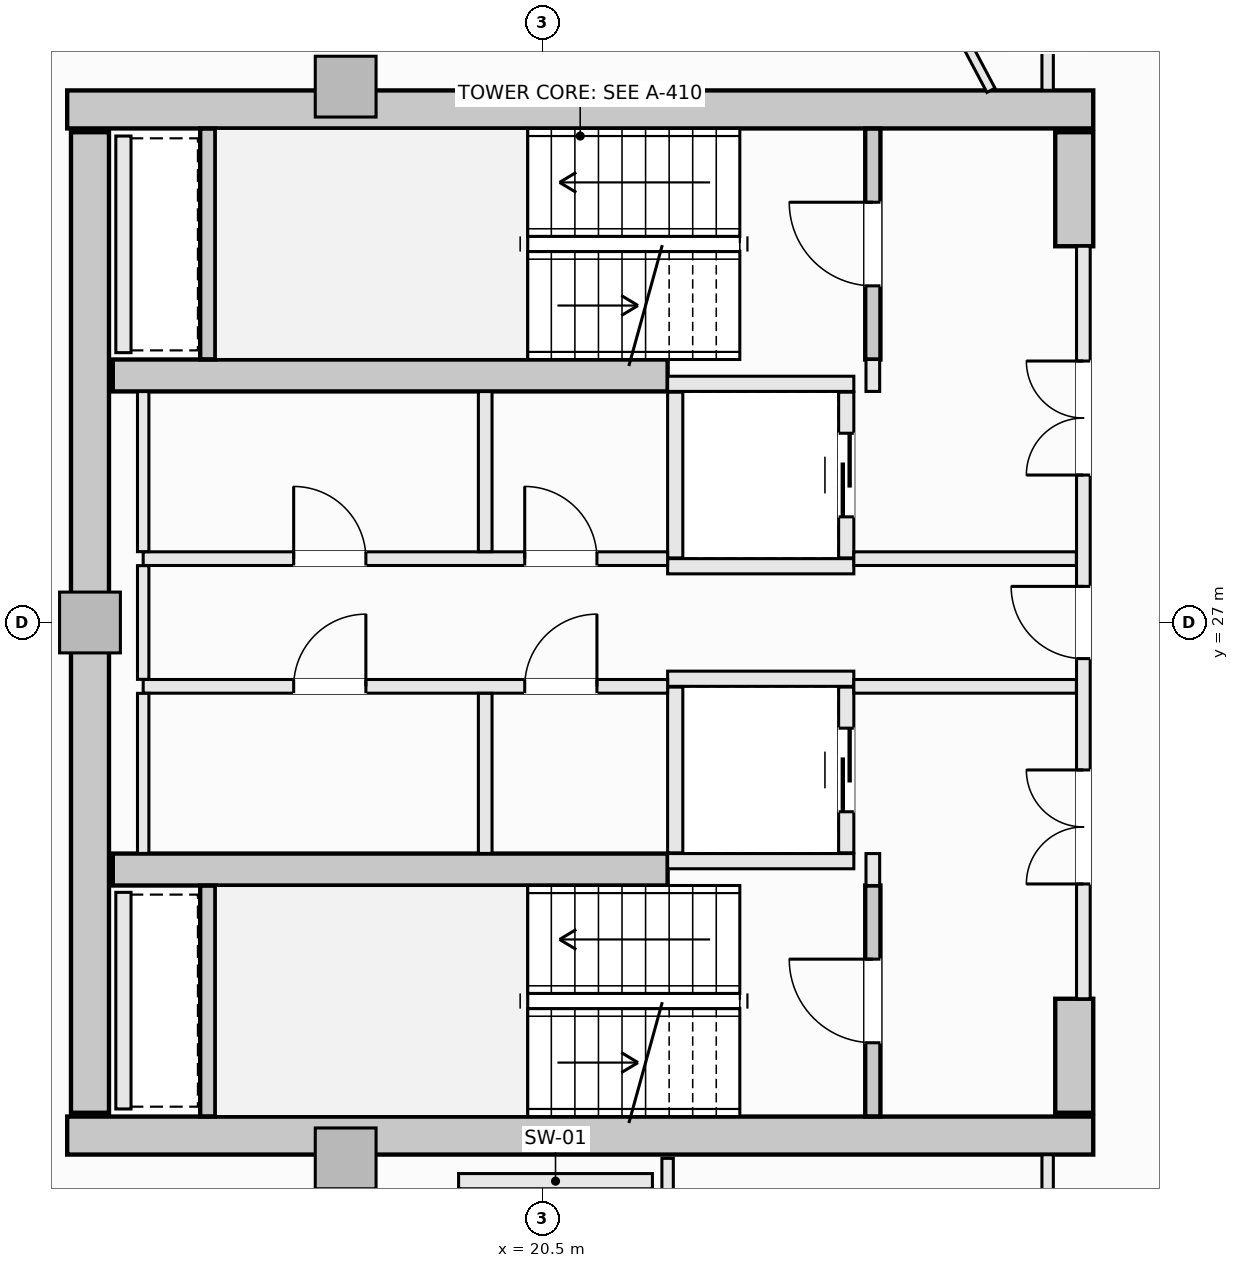
"""IFC4 building model, lengths in metres.
Left out: names, types, materials, properties, quantities, classifications, styles, units other than length and angle.
Written with IfcOpenShell. Run it as: python <this file> out.ifc"""

import sys

from ifc_helpers import new_model, si_unit, direction, frame, frame_2d, origin, origin_2d, place, context, subcontext, project, spatial, rectangle, extrude, element, fill, save


model = new_model("IFC4")
c1 = context("Model", 3, precision=1e-05, world=origin(), true_north=direction((0.0, 1.0)))
c2 = subcontext(c1, "Body", "Model", "MODEL_VIEW")
j1 = project(units=[si_unit("LENGTHUNIT", "METRE"), si_unit("PLANEANGLEUNIT", "RADIAN")], contexts=[c1])
p1 = place(None, origin())
s1 = spatial("IfcSite", under=j1, at=p1, CompositionType="ELEMENT")
p2 = place(p1, origin())
s2 = spatial("IfcBuilding", under=s1, at=p2, CompositionType="ELEMENT")
p3 = place(p2, frame((0.0, 0.0, 212.9)))
s3 = spatial("IfcBuildingStorey", under=s2, at=p3, CompositionType="ELEMENT", Elevation=212.9)
for number, where, z_axis, x_axis in (
    (1, (14.25, 33.75, -0.27), (0.0, 0.0, 1.0), (1.0, 0.0, 0.0)),
    (2, (14.25, 20.25, -0.27), (0.0, 0.0, 1.0), (1.0, 0.0, 0.0)),
):
    element("IfcWall", number, at=place(p3, frame(where, z_axis=z_axis, x_axis=x_axis)), inside=s3, PredefinedType="SHEAR", context=c2, shape_type="SweptSolid", body=[
        extrude(rectangle(XDim=13.5, YDim=0.5, at=frame_2d((6.75, 0.0))), origin(), (0.0, 0.0, 1.0), 3.3),
    ])
p4 = place(p3, frame((14.55, 20.55, -0.27), z_axis=(0.0, 0.0, 1.0), x_axis=(0.0, 1.0, 0.0)))
e3 = element("IfcWall", 3, at=p4, inside=s3, PredefinedType="SHEAR", context=c2, shape_type="SweptSolid", body=[
    extrude(rectangle(XDim=12.9, YDim=0.5, at=frame_2d((6.45, 0.0))), origin(), (0.0, 0.0, 1.0), 3.3),
])
for number, where, z_axis, x_axis in (
    (4, (27.5, 31.95, -0.27), (0.0, 0.0, 1.0), (0.0, 1.0, 0.0)),
    (5, (27.5, 20.55, -0.27), (0.0, 0.0, 1.0), (0.0, 1.0, 0.0)),
):
    element("IfcWall", number, at=place(p3, frame(where, z_axis=z_axis, x_axis=x_axis)), inside=s3, PredefinedType="SHEAR", context=c2, shape_type="SweptSolid", body=[
        extrude(rectangle(XDim=1.5, YDim=0.5, at=frame_2d((0.75, 0.0))), origin(), (0.0, 0.0, 1.0), 3.3),
    ])
for number, where, z_axis, x_axis in (
    (6, (14.85, 30.25, -0.27), (0.0, 0.0, 1.0), (1.0, 0.0, 0.0)),
    (7, (14.85, 23.75, -0.27), (0.0, 0.0, 1.0), (1.0, 0.0, 0.0)),
):
    element("IfcWall", number, at=place(p3, frame(where, z_axis=z_axis, x_axis=x_axis)), inside=s3, PredefinedType="SHEAR", context=c2, shape_type="SweptSolid", body=[
        extrude(rectangle(XDim=7.3, YDim=0.42, at=frame_2d((3.65, 0.0))), origin(), (0.0, 0.0, 1.0), 3.3),
    ])
for number, where, z_axis, x_axis in (
    (8, (17.914, 34.05, -0.27), (0.0, 0.0, 1.0), (1.0, 0.0, 0.0)),
    (9, (14.55, 27.0, -0.27), (0.0, 0.0, 1.0), (1.0, 0.0, 0.0)),
    (10, (17.914, 19.95, -0.27), (0.0, 0.0, 1.0), (1.0, 0.0, 0.0)),
):
    element("IfcColumn", number, at=place(p3, frame(where, z_axis=z_axis, x_axis=x_axis)), inside=s3, PredefinedType="PILASTER", context=c2, shape_type="SweptSolid", body=[
        extrude(rectangle(XDim=0.8, YDim=0.8, at=origin_2d()), origin(), (0.0, 0.0, 1.0), 3.3),
    ])
p5 = place(p3, frame((24.85, 30.46, -0.27), z_axis=(0.0, 0.0, 1.0), x_axis=(0.0, 1.0, 0.0)))
e11 = element("IfcWall", 11, at=p5, inside=s3, PredefinedType="SHEAR", context=c2, shape_type="SweptSolid", body=[
    extrude(rectangle(XDim=3.038, YDim=0.2, at=frame_2d((1.519, 0.0))), origin(), (0.0, 0.0, 1.0), 3.3),
])
p6 = place(p5, frame((0.969, 0.0, 0.27)))
e12 = element("IfcOpeningElement", 12, at=p6, cuts=e11, PredefinedType="OPENING", context=c2, shape_type="SweptSolid", body=[
    extrude(rectangle(XDim=1.1, YDim=2.15, at=frame_2d((0.55, 1.075))), frame((0.0, 0.11, 0.0), z_axis=(0.0, -1.0, 0.0), x_axis=(1.0, 0.0, 0.0)), (0.0, 0.0, 1.0), 0.22),
])
p7 = place(p3, frame((16.1, 30.462, -0.27), z_axis=(0.0, 0.0, 1.0), x_axis=(0.0, 1.0, 0.0)))
e13 = element("IfcWall", 13, at=p7, inside=s3, PredefinedType="SHEAR", context=c2, shape_type="SweptSolid", body=[
    extrude(rectangle(XDim=3.036, YDim=0.2, at=frame_2d((1.518, 0.0))), origin(), (0.0, 0.0, 1.0), 3.3),
])
p8 = place(p3, frame((24.85, 20.502, -0.27), z_axis=(0.0, 0.0, 1.0), x_axis=(0.0, 1.0, 0.0)))
e14 = element("IfcWall", 14, at=p8, inside=s3, PredefinedType="SHEAR", context=c2, shape_type="SweptSolid", body=[
    extrude(rectangle(XDim=3.038, YDim=0.2, at=frame_2d((1.519, 0.0))), origin(), (0.0, 0.0, 1.0), 3.3),
])
p9 = place(p8, frame((0.969, 0.0, 0.27)))
e15 = element("IfcOpeningElement", 15, at=p9, cuts=e14, PredefinedType="OPENING", context=c2, shape_type="SweptSolid", body=[
    extrude(rectangle(XDim=1.1, YDim=2.15, at=frame_2d((0.55, 1.075))), frame((0.0, 0.11, 0.0), z_axis=(0.0, -1.0, 0.0), x_axis=(1.0, 0.0, 0.0)), (0.0, 0.0, 1.0), 0.22),
])
p10 = place(p3, frame((16.1, 20.502, -0.27), z_axis=(0.0, 0.0, 1.0), x_axis=(0.0, 1.0, 0.0)))
e16 = element("IfcWall", 16, at=p10, inside=s3, PredefinedType="SHEAR", context=c2, shape_type="SweptSolid", body=[
    extrude(rectangle(XDim=3.036, YDim=0.2, at=frame_2d((1.518, 0.0))), origin(), (0.0, 0.0, 1.0), 3.3),
])
for number, where, z_axis, x_axis in (
    (17, (22.15, 30.14, 0.0), (0.0, 0.0, 1.0), (1.0, 0.0, 0.0)),
    (18, (22.15, 27.74, 0.0), (0.0, 0.0, 1.0), (1.0, 0.0, 0.0)),
):
    element("IfcWall", number, at=place(p3, frame(where, z_axis=z_axis, x_axis=x_axis)), inside=s3, PredefinedType="SOLIDWALL", context=c2, shape_type="SweptSolid", body=[
        extrude(rectangle(XDim=2.45, YDim=0.2, at=frame_2d((1.225, 0.0))), origin(), (0.0, 0.0, 1.0), 3.03),
    ])
p11 = place(p3, frame((22.25, 27.85, 0.0), z_axis=(0.0, 0.0, 1.0), x_axis=(0.0, 1.0, 0.0)))
e19 = element("IfcWall", 19, at=p11, inside=s3, PredefinedType="SOLIDWALL", context=c2, shape_type="SweptSolid", body=[
    extrude(rectangle(XDim=2.18, YDim=0.2, at=frame_2d((1.09, 0.0))), origin(), (0.0, 0.0, 1.0), 3.03),
])
p12 = place(p3, frame((24.5, 27.85, 0.0), z_axis=(0.0, 0.0, 1.0), x_axis=(0.0, 1.0, 0.0)))
e20 = element("IfcWall", 20, at=p12, inside=s3, PredefinedType="SOLIDWALL", context=c2, shape_type="SweptSolid", body=[
    extrude(rectangle(XDim=2.18, YDim=0.2, at=frame_2d((1.09, 0.0))), origin(), (0.0, 0.0, 1.0), 3.03),
])
p13 = place(p12, frame((0.54, 0.0, 0.0)))
e21 = element("IfcOpeningElement", 21, at=p13, cuts=e20, PredefinedType="OPENING", context=c2, shape_type="SweptSolid", body=[
    extrude(rectangle(XDim=1.1, YDim=2.2, at=frame_2d((0.55, 1.1))), frame((0.0, 0.11, 0.0), z_axis=(0.0, -1.0, 0.0), x_axis=(1.0, 0.0, 0.0)), (0.0, 0.0, 1.0), 0.22),
])
for number, where, z_axis, x_axis in (
    (22, (22.15, 26.26, 0.0), (0.0, 0.0, 1.0), (1.0, 0.0, 0.0)),
    (23, (22.15, 23.86, 0.0), (0.0, 0.0, 1.0), (1.0, 0.0, 0.0)),
):
    element("IfcWall", number, at=place(p3, frame(where, z_axis=z_axis, x_axis=x_axis)), inside=s3, PredefinedType="SOLIDWALL", context=c2, shape_type="SweptSolid", body=[
        extrude(rectangle(XDim=2.45, YDim=0.2, at=frame_2d((1.225, 0.0))), origin(), (0.0, 0.0, 1.0), 3.03),
    ])
p14 = place(p3, frame((22.25, 23.97, 0.0), z_axis=(0.0, 0.0, 1.0), x_axis=(0.0, 1.0, 0.0)))
e24 = element("IfcWall", 24, at=p14, inside=s3, PredefinedType="SOLIDWALL", context=c2, shape_type="SweptSolid", body=[
    extrude(rectangle(XDim=2.18, YDim=0.2, at=frame_2d((1.09, 0.0))), origin(), (0.0, 0.0, 1.0), 3.03),
])
p15 = place(p3, frame((24.5, 23.97, 0.0), z_axis=(0.0, 0.0, 1.0), x_axis=(0.0, 1.0, 0.0)))
e25 = element("IfcWall", 25, at=p15, inside=s3, PredefinedType="SOLIDWALL", context=c2, shape_type="SweptSolid", body=[
    extrude(rectangle(XDim=2.18, YDim=0.2, at=frame_2d((1.09, 0.0))), origin(), (0.0, 0.0, 1.0), 3.03),
])
p16 = place(p15, frame((0.54, 0.0, 0.0)))
e26 = element("IfcOpeningElement", 26, at=p16, cuts=e25, PredefinedType="OPENING", context=c2, shape_type="SweptSolid", body=[
    extrude(rectangle(XDim=1.1, YDim=2.2, at=frame_2d((0.55, 1.1))), frame((0.0, 0.11, 0.0), z_axis=(0.0, -1.0, 0.0), x_axis=(1.0, 0.0, 0.0)), (0.0, 0.0, 1.0), 0.22),
])
p17 = place(p3, frame((19.4, 19.65, 0.0), z_axis=(0.0, 0.0, 1.0), x_axis=(1.0, 0.0, 0.0)))
e27 = element("IfcWall", 27, at=p17, inside=s3, PredefinedType="SOLIDWALL", context=c2, shape_type="SweptSolid", body=[
    extrude(rectangle(XDim=2.55, YDim=0.2, at=frame_2d((1.275, 0.0))), origin(), (0.0, 0.0, 1.0), 3.03),
])
for number, where, z_axis, x_axis in (
    (28, (14.99, 30.55, 0.0), (0.0, 0.0, 1.0), (0.0, 1.0, 0.0)),
    (29, (14.99, 20.6, 0.0), (0.0, 0.0, 1.0), (0.0, 1.0, 0.0)),
):
    element("IfcWall", number, at=place(p3, frame(where, z_axis=z_axis, x_axis=x_axis)), inside=s3, PredefinedType="SOLIDWALL", context=c2, shape_type="SweptSolid", body=[
        extrude(rectangle(XDim=2.85, YDim=0.2, at=frame_2d((1.425, 0.0))), origin(), (0.0, 0.0, 1.0), 3.03),
    ])
for number, where, z_axis, x_axis in (
    (30, (24.85, 23.54, 0.0), (0.0, 0.0, 1.0), (0.0, 1.0, 0.0)),
    (31, (24.85, 30.04, 0.0), (0.0, 0.0, 1.0), (0.0, 1.0, 0.0)),
):
    element("IfcWall", number, at=place(p3, frame(where, z_axis=z_axis, x_axis=x_axis)), inside=s3, PredefinedType="SOLIDWALL", context=c2, shape_type="SweptSolid", body=[
        extrude(rectangle(XDim=0.42, YDim=0.18, at=frame_2d((0.21, 0.0))), origin(), (0.0, 0.0, 1.0), 3.03),
    ])
p18 = place(p3, frame((27.62, 22.05, 0.0), z_axis=(0.0, 0.0, 1.0), x_axis=(0.0, 1.0, 0.0)))
e32 = element("IfcWall", 32, at=p18, inside=s3, PredefinedType="SOLIDWALL", context=c2, shape_type="SweptSolid", body=[
    extrude(rectangle(XDim=9.9, YDim=0.18, at=frame_2d((4.95, 0.0))), origin(), (0.0, 0.0, 1.0), 3.03),
])
p19 = place(p18, frame((4.475, 0.0, 0.0)))
e33 = element("IfcOpeningElement", 33, at=p19, cuts=e32, PredefinedType="OPENING", context=c2, shape_type="SweptSolid", body=[
    extrude(rectangle(XDim=0.95, YDim=2.1, at=frame_2d((0.475, 1.05))), frame((0.0, 0.1, 0.0), z_axis=(0.0, -1.0, 0.0), x_axis=(1.0, 0.0, 0.0)), (0.0, 0.0, 1.0), 0.2),
])
p20 = place(p18, frame((6.89, 0.0, 0.0)))
e34 = element("IfcOpeningElement", 34, at=p20, cuts=e32, PredefinedType="OPENING", context=c2, shape_type="SweptSolid", body=[
    extrude(rectangle(XDim=1.5, YDim=2.2, at=frame_2d((0.75, 1.1))), frame((0.0, 0.1, 0.0), z_axis=(0.0, -1.0, 0.0), x_axis=(1.0, 0.0, 0.0)), (0.0, 0.0, 1.0), 0.2),
])
p21 = place(p18, frame((1.51, 0.0, 0.0)))
e35 = element("IfcOpeningElement", 35, at=p21, cuts=e32, PredefinedType="OPENING", context=c2, shape_type="SweptSolid", body=[
    extrude(rectangle(XDim=1.5, YDim=2.2, at=frame_2d((0.75, 1.1))), frame((0.0, 0.1, 0.0), z_axis=(0.0, -1.0, 0.0), x_axis=(1.0, 0.0, 0.0)), (0.0, 0.0, 1.0), 0.2),
])
p22 = place(p3, frame((15.25, 27.84, 0.0), z_axis=(0.0, 0.0, 1.0), x_axis=(1.0, 0.0, 0.0)))
e36 = element("IfcWall", 36, at=p22, inside=s3, PredefinedType="SOLIDWALL", context=c2, shape_type="SweptSolid", body=[
    extrude(rectangle(XDim=6.9, YDim=0.18, at=frame_2d((3.45, 0.0))), origin(), (0.0, 0.0, 1.0), 3.03),
])
p23 = place(p22, frame((5.02, 0.0, 0.0)))
e37 = element("IfcOpeningElement", 37, at=p23, cuts=e36, PredefinedType="OPENING", context=c2, shape_type="SweptSolid", body=[
    extrude(rectangle(XDim=0.95, YDim=2.1, at=frame_2d((0.475, 1.05))), frame((0.0, 0.1, 0.0), z_axis=(0.0, -1.0, 0.0), x_axis=(1.0, 0.0, 0.0)), (0.0, 0.0, 1.0), 0.2),
])
p24 = place(p22, frame((1.98, 0.0, 0.0)))
e38 = element("IfcOpeningElement", 38, at=p24, cuts=e36, PredefinedType="OPENING", context=c2, shape_type="SweptSolid", body=[
    extrude(rectangle(XDim=0.95, YDim=2.1, at=frame_2d((0.475, 1.05))), frame((0.0, 0.1, 0.0), z_axis=(0.0, -1.0, 0.0), x_axis=(1.0, 0.0, 0.0)), (0.0, 0.0, 1.0), 0.2),
])
p25 = place(p3, frame((24.6, 27.84, 0.0), z_axis=(0.0, 0.0, 1.0), x_axis=(1.0, 0.0, 0.0)))
e39 = element("IfcWall", 39, at=p25, inside=s3, PredefinedType="SOLIDWALL", context=c2, shape_type="SweptSolid", body=[
    extrude(rectangle(XDim=2.928, YDim=0.18, at=frame_2d((1.464, 0.0))), origin(), (0.0, 0.0, 1.0), 3.03),
])
p26 = place(p3, frame((15.25, 26.16, 0.0), z_axis=(0.0, 0.0, 1.0), x_axis=(1.0, 0.0, 0.0)))
e40 = element("IfcWall", 40, at=p26, inside=s3, PredefinedType="SOLIDWALL", context=c2, shape_type="SweptSolid", body=[
    extrude(rectangle(XDim=6.9, YDim=0.18, at=frame_2d((3.45, 0.0))), origin(), (0.0, 0.0, 1.0), 3.03),
])
p27 = place(p26, frame((5.02, 0.0, 0.0)))
e41 = element("IfcOpeningElement", 41, at=p27, cuts=e40, PredefinedType="OPENING", context=c2, shape_type="SweptSolid", body=[
    extrude(rectangle(XDim=0.95, YDim=2.1, at=frame_2d((0.475, 1.05))), frame((0.0, 0.1, 0.0), z_axis=(0.0, -1.0, 0.0), x_axis=(1.0, 0.0, 0.0)), (0.0, 0.0, 1.0), 0.2),
])
p28 = place(p26, frame((1.98, 0.0, 0.0)))
e42 = element("IfcOpeningElement", 42, at=p28, cuts=e40, PredefinedType="OPENING", context=c2, shape_type="SweptSolid", body=[
    extrude(rectangle(XDim=0.95, YDim=2.1, at=frame_2d((0.475, 1.05))), frame((0.0, 0.1, 0.0), z_axis=(0.0, -1.0, 0.0), x_axis=(1.0, 0.0, 0.0)), (0.0, 0.0, 1.0), 0.2),
])
p29 = place(p3, frame((24.6, 26.16, 0.0), z_axis=(0.0, 0.0, 1.0), x_axis=(1.0, 0.0, 0.0)))
e43 = element("IfcWall", 43, at=p29, inside=s3, PredefinedType="SOLIDWALL", context=c2, shape_type="SweptSolid", body=[
    extrude(rectangle(XDim=2.928, YDim=0.18, at=frame_2d((1.464, 0.0))), origin(), (0.0, 0.0, 1.0), 3.03),
])
p30 = place(p3, frame((15.25, 23.962, 0.0), z_axis=(0.0, 0.0, 1.0), x_axis=(0.0, 1.0, 0.0)))
e44 = element("IfcWall", 44, at=p30, inside=s3, PredefinedType="PARTITIONING", context=c2, shape_type="SweptSolid", body=[
    extrude(rectangle(XDim=2.106, YDim=0.15, at=frame_2d((1.053, 0.0))), origin(), (0.0, 0.0, 1.0), 3.03),
])
p31 = place(p3, frame((15.25, 26.252, 0.0), z_axis=(0.0, 0.0, 1.0), x_axis=(0.0, 1.0, 0.0)))
e45 = element("IfcWall", 45, at=p31, inside=s3, PredefinedType="PARTITIONING", context=c2, shape_type="SweptSolid", body=[
    extrude(rectangle(XDim=1.496, YDim=0.15, at=frame_2d((0.748, 0.0))), origin(), (0.0, 0.0, 1.0), 3.03),
])
p32 = place(p3, frame((15.25, 27.932, 0.0), z_axis=(0.0, 0.0, 1.0), x_axis=(0.0, 1.0, 0.0)))
e46 = element("IfcWall", 46, at=p32, inside=s3, PredefinedType="PARTITIONING", context=c2, shape_type="SweptSolid", body=[
    extrude(rectangle(XDim=2.106, YDim=0.15, at=frame_2d((1.053, 0.0))), origin(), (0.0, 0.0, 1.0), 3.03),
])
for number, where, z_axis, x_axis in (
    (47, (19.75, 23.962, 0.0), (0.0, 0.0, 1.0), (0.0, 1.0, 0.0)),
    (48, (19.75, 27.932, 0.0), (0.0, 0.0, 1.0), (0.0, 1.0, 0.0)),
):
    element("IfcWall", number, at=place(p3, frame(where, z_axis=z_axis, x_axis=x_axis)), inside=s3, PredefinedType="SOLIDWALL", context=c2, shape_type="SweptSolid", body=[
        extrude(rectangle(XDim=2.106, YDim=0.18, at=frame_2d((1.053, 0.0))), origin(), (0.0, 0.0, 1.0), 3.03),
    ])
p33 = place(p3, frame((22.15, 17.127, 0.0), z_axis=(0.0, 0.0, 1.0), x_axis=(0.0, 1.0, 0.0)))
e49 = element("IfcWall", 49, at=p33, inside=s3, PredefinedType="PARTITIONING", context=c2, shape_type="SweptSolid", body=[
    extrude(rectangle(XDim=2.823, YDim=0.15, at=frame_2d((1.412, 0.0))), origin(), (0.0, 0.0, 1.0), 3.03),
])
p34 = place(p3, frame((27.15, 17.127, 0.0), z_axis=(0.0, 0.0, 1.0), x_axis=(0.0, 1.0, 0.0)))
e50 = element("IfcWall", 50, at=p34, inside=s3, PredefinedType="PARTITIONING", context=c2, shape_type="SweptSolid", body=[
    extrude(rectangle(XDim=2.871, YDim=0.15, at=frame_2d((1.436, 0.0))), origin(), (0.0, 0.0, 1.0), 3.03),
])
p35 = place(p34, frame((0.96, 0.0, 0.0)))
e51 = element("IfcOpeningElement", 51, at=p35, cuts=e50, PredefinedType="OPENING", context=c2, shape_type="SweptSolid", body=[
    extrude(rectangle(XDim=0.95, YDim=2.1, at=frame_2d((0.475, 1.05))), frame((0.0, 0.085, 0.0), z_axis=(0.0, -1.0, 0.0), x_axis=(1.0, 0.0, 0.0)), (0.0, 0.0, 1.0), 0.17),
])
p36 = place(p3, frame((27.15, 34.002, 0.0), z_axis=(0.0, 0.0, 1.0), x_axis=(0.0, 1.0, 0.0)))
e52 = element("IfcWall", 52, at=p36, inside=s3, PredefinedType="PARTITIONING", context=c2, shape_type="SweptSolid", body=[
    extrude(rectangle(XDim=4.198, YDim=0.15, at=frame_2d((2.099, 0.0))), origin(), (0.0, 0.0, 1.0), 3.03),
])
p37 = place(p36, frame((1.998, 0.0, 0.0)))
e53 = element("IfcOpeningElement", 53, at=p37, cuts=e52, PredefinedType="OPENING", context=c2, shape_type="SweptSolid", body=[
    extrude(rectangle(XDim=0.95, YDim=2.1, at=frame_2d((0.475, 1.05))), frame((0.0, 0.085, 0.0), z_axis=(0.0, -1.0, 0.0), x_axis=(1.0, 0.0, 0.0)), (0.0, 0.0, 1.0), 0.17),
])
p38 = place(p3, frame((25.831, 35.083, 0.0), z_axis=(0.0, 0.0, 1.0), x_axis=(0.468630025993, -0.883394531757, 0.0)))
e54 = element("IfcWall", 54, at=p38, inside=s3, PredefinedType="PARTITIONING", context=c2, shape_type="SweptSolid", body=[
    extrude(rectangle(XDim=1.224, YDim=0.12, at=frame_2d((0.612, 0.0))), origin(), (0.0, 0.0, 1.0), 3.03),
])
p39 = place(p6, origin())
e55 = element("IfcDoor", 55, at=p39, inside=s3, OperationType="SINGLE_SWING_RIGHT", PredefinedType="DOOR", context=c2, shape_type="SweptSolid", body=[
    extrude(rectangle(XDim=1.1, YDim=2.15, at=frame_2d((0.55, 1.075))), frame((0.0, 0.025, 0.0), z_axis=(0.0, -1.0, 0.0), x_axis=(1.0, 0.0, 0.0)), (0.0, 0.0, 1.0), 0.05),
])
fill(e12, e55)
p40 = place(p9, origin())
e56 = element("IfcDoor", 56, at=p40, inside=s3, OperationType="SINGLE_SWING_RIGHT", PredefinedType="DOOR", context=c2, shape_type="SweptSolid", body=[
    extrude(rectangle(XDim=1.1, YDim=2.15, at=frame_2d((0.55, 1.075))), frame((0.0, 0.025, 0.0), z_axis=(0.0, -1.0, 0.0), x_axis=(1.0, 0.0, 0.0)), (0.0, 0.0, 1.0), 0.05),
])
fill(e15, e56)
p41 = place(p13, origin())
e57 = element("IfcDoor", 57, at=p41, inside=s3, OperationType="SLIDING_TO_LEFT", PredefinedType="DOOR", context=c2, shape_type="SweptSolid", body=[
    extrude(rectangle(XDim=1.1, YDim=2.2, at=frame_2d((0.55, 1.1))), frame((0.0, 0.025, 0.0), z_axis=(0.0, -1.0, 0.0), x_axis=(1.0, 0.0, 0.0)), (0.0, 0.0, 1.0), 0.05),
])
fill(e21, e57)
p42 = place(p16, origin())
e58 = element("IfcDoor", 58, at=p42, inside=s3, OperationType="SLIDING_TO_LEFT", PredefinedType="DOOR", context=c2, shape_type="SweptSolid", body=[
    extrude(rectangle(XDim=1.1, YDim=2.2, at=frame_2d((0.55, 1.1))), frame((0.0, 0.025, 0.0), z_axis=(0.0, -1.0, 0.0), x_axis=(1.0, 0.0, 0.0)), (0.0, 0.0, 1.0), 0.05),
])
fill(e26, e58)
p43 = place(p19, origin())
e59 = element("IfcDoor", 59, at=p43, inside=s3, OperationType="SINGLE_SWING_RIGHT", PredefinedType="DOOR", context=c2, shape_type="SweptSolid", body=[
    extrude(rectangle(XDim=0.95, YDim=2.1, at=frame_2d((0.475, 1.05))), frame((0.0, 0.025, 0.0), z_axis=(0.0, -1.0, 0.0), x_axis=(1.0, 0.0, 0.0)), (0.0, 0.0, 1.0), 0.05),
])
fill(e33, e59)
p44 = place(p20, origin())
e60 = element("IfcDoor", 60, at=p44, inside=s3, OperationType="DOUBLE_DOOR_SINGLE_SWING", PredefinedType="DOOR", context=c2, shape_type="SweptSolid", body=[
    extrude(rectangle(XDim=1.5, YDim=2.2, at=frame_2d((0.75, 1.1))), frame((0.0, 0.025, 0.0), z_axis=(0.0, -1.0, 0.0), x_axis=(1.0, 0.0, 0.0)), (0.0, 0.0, 1.0), 0.05),
])
fill(e34, e60)
p45 = place(p21, origin())
e61 = element("IfcDoor", 61, at=p45, inside=s3, OperationType="DOUBLE_DOOR_SINGLE_SWING", PredefinedType="DOOR", context=c2, shape_type="SweptSolid", body=[
    extrude(rectangle(XDim=1.5, YDim=2.2, at=frame_2d((0.75, 1.1))), frame((0.0, 0.025, 0.0), z_axis=(0.0, -1.0, 0.0), x_axis=(1.0, 0.0, 0.0)), (0.0, 0.0, 1.0), 0.05),
])
fill(e35, e61)
p46 = place(p23, origin())
e62 = element("IfcDoor", 62, at=p46, inside=s3, OperationType="SINGLE_SWING_LEFT", PredefinedType="DOOR", context=c2, shape_type="SweptSolid", body=[
    extrude(rectangle(XDim=0.95, YDim=2.1, at=frame_2d((0.475, 1.05))), frame((0.0, 0.025, 0.0), z_axis=(0.0, -1.0, 0.0), x_axis=(1.0, 0.0, 0.0)), (0.0, 0.0, 1.0), 0.05),
])
fill(e37, e62)
p47 = place(p27, origin())
e63 = element("IfcDoor", 63, at=p47, inside=s3, OperationType="SINGLE_SWING_RIGHT", PredefinedType="DOOR", context=c2, shape_type="SweptSolid", body=[
    extrude(rectangle(XDim=0.95, YDim=2.1, at=frame_2d((0.475, 1.05))), frame((0.0, 0.025, 0.0), z_axis=(0.0, -1.0, 0.0), x_axis=(1.0, 0.0, 0.0)), (0.0, 0.0, 1.0), 0.05),
])
fill(e41, e63)
p48 = place(p24, origin())
e64 = element("IfcDoor", 64, at=p48, inside=s3, OperationType="SINGLE_SWING_LEFT", PredefinedType="DOOR", context=c2, shape_type="SweptSolid", body=[
    extrude(rectangle(XDim=0.95, YDim=2.1, at=frame_2d((0.475, 1.05))), frame((0.0, 0.025, 0.0), z_axis=(0.0, -1.0, 0.0), x_axis=(1.0, 0.0, 0.0)), (0.0, 0.0, 1.0), 0.05),
])
fill(e38, e64)
p49 = place(p28, origin())
e65 = element("IfcDoor", 65, at=p49, inside=s3, OperationType="SINGLE_SWING_RIGHT", PredefinedType="DOOR", context=c2, shape_type="SweptSolid", body=[
    extrude(rectangle(XDim=0.95, YDim=2.1, at=frame_2d((0.475, 1.05))), frame((0.0, 0.025, 0.0), z_axis=(0.0, -1.0, 0.0), x_axis=(1.0, 0.0, 0.0)), (0.0, 0.0, 1.0), 0.05),
])
fill(e42, e65)
save(model, sys.argv[1])
